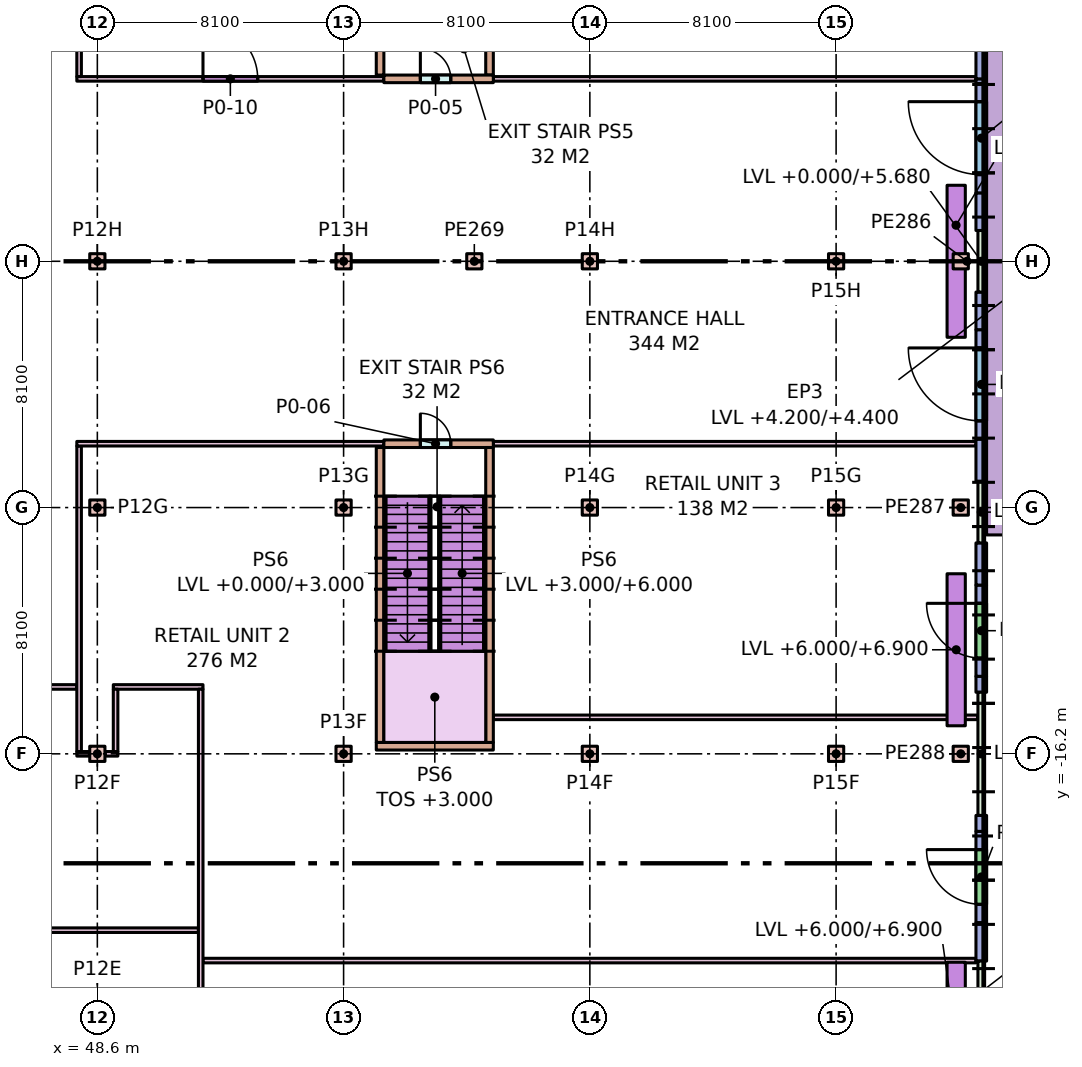
"""IFC4 building model, lengths in metres.
Left out: names, types, materials, properties, quantities, classifications, styles, units other than length and angle.
Written with IfcOpenShell. Run it as: python <this file> out.ifc"""

import sys

from ifc_helpers import new_model, si_unit, direction, frame, frame_2d, origin, origin_2d, place, context, subcontext, project, spatial, rectangle, extrude, element, fill, save


model = new_model("IFC4")
c1 = context("Model", 3, precision=1e-05, world=origin(), true_north=direction((0.0, 1.0)))
c2 = subcontext(c1, "Body", "Model", "MODEL_VIEW")
j1 = project(units=[si_unit("LENGTHUNIT", "METRE"), si_unit("PLANEANGLEUNIT", "RADIAN")], contexts=[c1])
p1 = place(None, origin())
s1 = spatial("IfcSite", under=j1, at=p1, CompositionType="ELEMENT")
p2 = place(p1, origin())
s2 = spatial("IfcBuilding", under=s1, at=p2, CompositionType="ELEMENT")
p3 = place(p2, origin())
s3 = spatial("IfcBuildingStorey", under=s2, at=p3, CompositionType="ELEMENT", Elevation=0.0)
for number, where, z_axis, x_axis in (
    (1, (48.6, -16.2, 0.0), (0.0, 0.0, 1.0), (1.0, 0.0, 0.0)),
    (2, (48.6, -8.1, 0.0), (0.0, 0.0, 1.0), (1.0, 0.0, 0.0)),
    (3, (48.6, 0.0, 0.0), (0.0, 0.0, 1.0), (1.0, 0.0, 0.0)),
    (4, (56.7, -16.2, 0.0), (0.0, 0.0, 1.0), (1.0, 0.0, 0.0)),
    (5, (56.7, -8.1, 0.0), (0.0, 0.0, 1.0), (1.0, 0.0, 0.0)),
    (6, (56.7, 0.0, 0.0), (0.0, 0.0, 1.0), (1.0, 0.0, 0.0)),
    (7, (64.8, -16.2, 0.0), (0.0, 0.0, 1.0), (1.0, 0.0, 0.0)),
    (8, (64.8, -8.1, 0.0), (0.0, 0.0, 1.0), (1.0, 0.0, 0.0)),
    (9, (64.8, 0.0, 0.0), (0.0, 0.0, 1.0), (1.0, 0.0, 0.0)),
    (10, (72.9, -16.2, 0.0), (0.0, 0.0, 1.0), (1.0, 0.0, 0.0)),
    (11, (72.9, -8.1, 0.0), (0.0, 0.0, 1.0), (1.0, 0.0, 0.0)),
    (12, (72.9, 0.0, 0.0), (0.0, 0.0, 1.0), (1.0, 0.0, 0.0)),
    (13, (61.0, 0.0, 0.0), (0.0, 0.0, 1.0), (1.0, 0.0, 0.0)),
    (14, (77.0, 0.0, 0.0), (0.0, 0.0, 1.0), (1.0, 0.0, 0.0)),
    (15, (77.0, -8.1, 0.0), (0.0, 0.0, 1.0), (1.0, 0.0, 0.0)),
    (16, (77.0, -16.2, 0.0), (0.0, 0.0, 1.0), (1.0, 0.0, 0.0)),
):
    element("IfcColumn", number, at=place(p3, frame(where, z_axis=z_axis, x_axis=x_axis)), inside=s3, PredefinedType="COLUMN", context=c2, shape_type="SweptSolid", body=[
        extrude(rectangle(XDim=0.5, YDim=0.5, at=origin_2d()), origin(), (0.0, 0.0, 1.0), 6.0),
    ])
p4 = place(p3, frame((77.675, -23.017, 0.0), z_axis=(0.0, 0.0, 1.0), x_axis=(0.0, 1.0, 0.0)))
e17 = element("IfcWall", 17, at=p4, inside=s3, PredefinedType="STANDARD", context=c2, shape_type="SweptSolid", body=[
    extrude(rectangle(XDim=1.267, YDim=0.35, at=frame_2d((0.633, 0.0))), origin(), (0.0, 0.0, 1.0), 5.68),
])
p5 = place(p3, frame((77.675, -21.75, 0.0), z_axis=(0.0, 0.0, 1.0), x_axis=(0.0, 1.0, 0.0)))
e18 = element("IfcWall", 18, at=p5, inside=s3, PredefinedType="STANDARD", context=c2, shape_type="SweptSolid", body=[
    extrude(rectangle(XDim=3.0, YDim=0.35, at=frame_2d((1.5, 0.0))), origin(), (0.0, 0.0, 1.0), 5.68),
])
p6 = place(p5, frame((0.6, 0.0, 0.0)))
e19 = element("IfcOpeningElement", 19, at=p6, cuts=e18, PredefinedType="OPENING", context=c2, shape_type="SweptSolid", body=[
    extrude(rectangle(XDim=1.8, YDim=2.7, at=frame_2d((0.9, 1.35))), frame((0.0, 0.185, 0.0), z_axis=(0.0, -1.0, 0.0), x_axis=(1.0, 0.0, 0.0)), (0.0, 0.0, 1.0), 0.37),
])
p7 = place(p3, frame((77.675, -18.75, 0.0), z_axis=(0.0, 0.0, 1.0), x_axis=(0.0, 1.0, 0.0)))
e20 = element("IfcWall", 20, at=p7, inside=s3, PredefinedType="STANDARD", context=c2, shape_type="SweptSolid", body=[
    extrude(rectangle(XDim=0.525, YDim=0.35, at=frame_2d((0.262, 0.0))), origin(), (0.0, 0.0, 1.0), 5.68),
])
p8 = place(p3, frame((77.675, -14.175, 0.0), z_axis=(0.0, 0.0, 1.0), x_axis=(0.0, 1.0, 0.0)))
e21 = element("IfcWall", 21, at=p8, inside=s3, PredefinedType="STANDARD", context=c2, shape_type="SweptSolid", body=[
    extrude(rectangle(XDim=0.525, YDim=0.35, at=frame_2d((0.263, 0.0))), origin(), (0.0, 0.0, 1.0), 5.68),
])
p9 = place(p3, frame((77.675, -13.65, 0.0), z_axis=(0.0, 0.0, 1.0), x_axis=(0.0, 1.0, 0.0)))
e22 = element("IfcWall", 22, at=p9, inside=s3, PredefinedType="STANDARD", context=c2, shape_type="SweptSolid", body=[
    extrude(rectangle(XDim=3.0, YDim=0.35, at=frame_2d((1.5, 0.0))), origin(), (0.0, 0.0, 1.0), 5.68),
])
p10 = place(p9, frame((0.6, 0.0, 0.0)))
e23 = element("IfcOpeningElement", 23, at=p10, cuts=e22, PredefinedType="OPENING", context=c2, shape_type="SweptSolid", body=[
    extrude(rectangle(XDim=1.8, YDim=2.7, at=frame_2d((0.9, 1.35))), frame((0.0, 0.185, 0.0), z_axis=(0.0, -1.0, 0.0), x_axis=(1.0, 0.0, 0.0)), (0.0, 0.0, 1.0), 0.37),
])
for number, where, z_axis, x_axis in (
    (24, (77.675, -10.65, 0.0), (0.0, 0.0, 1.0), (0.0, 1.0, 0.0)),
    (25, (77.675, -7.238, 0.0), (0.0, 0.0, 1.0), (0.0, 1.0, 0.0)),
):
    element("IfcWall", number, at=place(p3, frame(where, z_axis=z_axis, x_axis=x_axis)), inside=s3, PredefinedType="STANDARD", context=c2, shape_type="SweptSolid", body=[
        extrude(rectangle(XDim=1.387, YDim=0.35, at=frame_2d((0.694, 0.0))), origin(), (0.0, 0.0, 1.0), 5.68),
    ])
p11 = place(p3, frame((77.675, -5.85, 0.0), z_axis=(0.0, 0.0, 1.0), x_axis=(0.0, 1.0, 0.0)))
e26 = element("IfcWall", 26, at=p11, inside=s3, PredefinedType="STANDARD", context=c2, shape_type="SweptSolid", body=[
    extrude(rectangle(XDim=3.6, YDim=0.35, at=frame_2d((1.8, 0.0))), origin(), (0.0, 0.0, 1.0), 5.68),
])
p12 = place(p11, frame((0.6, 0.0, 0.0)))
e27 = element("IfcOpeningElement", 27, at=p12, cuts=e26, PredefinedType="OPENING", context=c2, shape_type="SweptSolid", body=[
    extrude(rectangle(XDim=2.4, YDim=2.7, at=frame_2d((1.2, 1.35))), frame((0.0, 0.185, 0.0), z_axis=(0.0, -1.0, 0.0), x_axis=(1.0, 0.0, 0.0)), (0.0, 0.0, 1.0), 0.37),
])
for number, where, z_axis, x_axis in (
    (28, (77.675, -2.25, 0.0), (0.0, 0.0, 1.0), (0.0, 1.0, 0.0)),
    (29, (77.675, 1.012, 0.0), (0.0, 0.0, 1.0), (0.0, 1.0, 0.0)),
):
    element("IfcWall", number, at=place(p3, frame(where, z_axis=z_axis, x_axis=x_axis)), inside=s3, PredefinedType="STANDARD", context=c2, shape_type="SweptSolid", body=[
        extrude(rectangle(XDim=1.238, YDim=0.35, at=frame_2d((0.619, 0.0))), origin(), (0.0, 0.0, 1.0), 5.68),
    ])
p13 = place(p3, frame((77.675, 2.25, 0.0), z_axis=(0.0, 0.0, 1.0), x_axis=(0.0, 1.0, 0.0)))
e30 = element("IfcWall", 30, at=p13, inside=s3, PredefinedType="STANDARD", context=c2, shape_type="SweptSolid", body=[
    extrude(rectangle(XDim=3.6, YDim=0.35, at=frame_2d((1.8, 0.0))), origin(), (0.0, 0.0, 1.0), 5.68),
])
p14 = place(p13, frame((0.6, 0.0, 0.0)))
e31 = element("IfcOpeningElement", 31, at=p14, cuts=e30, PredefinedType="OPENING", context=c2, shape_type="SweptSolid", body=[
    extrude(rectangle(XDim=2.4, YDim=2.7, at=frame_2d((1.2, 1.35))), frame((0.0, 0.185, 0.0), z_axis=(0.0, -1.0, 0.0), x_axis=(1.0, 0.0, 0.0)), (0.0, 0.0, 1.0), 0.37),
])
p15 = place(p3, frame((77.675, 5.85, 0.0), z_axis=(0.0, 0.0, 1.0), x_axis=(0.0, 1.0, 0.0)))
e32 = element("IfcWall", 32, at=p15, inside=s3, PredefinedType="STANDARD", context=c2, shape_type="SweptSolid", body=[
    extrude(rectangle(XDim=0.15, YDim=0.35, at=frame_2d((0.075, 0.0))), origin(), (0.0, 0.0, 1.0), 5.68),
])
p16 = place(p3, frame((77.675, 6.0, 0.0), z_axis=(0.0, 0.0, 1.0), x_axis=(0.0, 1.0, 0.0)))
e33 = element("IfcWall", 33, at=p16, inside=s3, PredefinedType="STANDARD", context=c2, shape_type="SweptSolid", body=[
    extrude(rectangle(XDim=0.975, YDim=0.35, at=frame_2d((0.488, 0.0))), origin(), (0.0, 0.0, 1.0), 5.68),
])
for number, where, z_axis, x_axis in (
    (34, (76.85, -28.055, 6.0), (0.0, 0.0, 1.0), (0.0, 1.0, 0.0)),
    (35, (76.85, -15.277, 6.0), (0.0, 0.0, 1.0), (0.0, 1.0, 0.0)),
    (36, (76.85, -2.5, 6.0), (0.0, 0.0, 1.0), (0.0, 1.0, 0.0)),
):
    element("IfcWall", number, at=place(p3, frame(where, z_axis=z_axis, x_axis=x_axis)), inside=s3, PredefinedType="PARAPET", context=c2, shape_type="SweptSolid", body=[
        extrude(rectangle(XDim=5.0, YDim=0.6, at=frame_2d((2.5, 0.0))), origin(), (0.0, 0.0, 1.0), 0.9),
    ])
p17 = place(p3, frame((41.025, -14.0, 0.0), z_axis=(0.0, 0.0, 1.0), x_axis=(1.0, 0.0, 0.0)))
e37 = element("IfcWall", 37, at=p17, inside=s3, PredefinedType="PARTITIONING", context=c2, shape_type="SweptSolid", body=[
    extrude(rectangle(XDim=6.9, YDim=0.15, at=frame_2d((3.45, 0.0))), origin(), (0.0, 0.0, 1.0), 5.68),
])
p18 = place(p17, frame((2.95, 0.0, 0.0)))
e38 = element("IfcOpeningElement", 38, at=p18, cuts=e37, PredefinedType="OPENING", context=c2, shape_type="SweptSolid", body=[
    extrude(rectangle(XDim=1.0, YDim=2.1, at=frame_2d((0.5, 1.05))), frame((0.0, 0.085, 0.0), z_axis=(0.0, -1.0, 0.0), x_axis=(1.0, 0.0, 0.0)), (0.0, 0.0, 1.0), 0.17),
])
p19 = place(p3, frame((47.925, -16.2, 0.0), z_axis=(0.0, 0.0, 1.0), x_axis=(1.0, 0.0, 0.0)))
e39 = element("IfcWall", 39, at=p19, inside=s3, PredefinedType="PARTITIONING", context=c2, shape_type="SweptSolid", body=[
    extrude(rectangle(XDim=0.415, YDim=0.15, at=frame_2d((0.208, 0.0))), origin(), (0.0, 0.0, 1.0), 5.68),
])
p20 = place(p3, frame((48.86, -16.2, 0.0), z_axis=(0.0, 0.0, 1.0), x_axis=(1.0, 0.0, 0.0)))
e40 = element("IfcWall", 40, at=p20, inside=s3, PredefinedType="PARTITIONING", context=c2, shape_type="SweptSolid", body=[
    extrude(rectangle(XDim=0.415, YDim=0.15, at=frame_2d((0.208, 0.0))), origin(), (0.0, 0.0, 1.0), 5.68),
])
p21 = place(p3, frame((49.125, -14.0, 0.0), z_axis=(0.0, 0.0, 1.0), x_axis=(1.0, 0.0, 0.0)))
e41 = element("IfcWall", 41, at=p21, inside=s3, PredefinedType="PARTITIONING", context=c2, shape_type="SweptSolid", body=[
    extrude(rectangle(XDim=2.95, YDim=0.15, at=frame_2d((1.475, 0.0))), origin(), (0.0, 0.0, 1.0), 5.68),
])
p22 = place(p3, frame((48.0, -16.125, 0.0), z_axis=(0.0, 0.0, 1.0), x_axis=(0.0, 1.0, 0.0)))
e42 = element("IfcWall", 42, at=p22, inside=s3, PredefinedType="PARTITIONING", context=c2, shape_type="SweptSolid", body=[
    extrude(rectangle(XDim=10.05, YDim=0.15, at=frame_2d((5.025, 0.0))), origin(), (0.0, 0.0, 1.0), 5.68),
])
p23 = place(p3, frame((49.2, -16.125, 0.0), z_axis=(0.0, 0.0, 1.0), x_axis=(0.0, 1.0, 0.0)))
e43 = element("IfcWall", 43, at=p23, inside=s3, PredefinedType="PARTITIONING", context=c2, shape_type="SweptSolid", body=[
    extrude(rectangle(XDim=2.05, YDim=0.15, at=frame_2d((1.025, 0.0))), origin(), (0.0, 0.0, 1.0), 5.68),
])
p24 = place(p3, frame((34.125, -22.0, 0.0), z_axis=(0.0, 0.0, 1.0), x_axis=(1.0, 0.0, 0.0)))
e44 = element("IfcWall", 44, at=p24, inside=s3, PredefinedType="PARTITIONING", context=c2, shape_type="SweptSolid", body=[
    extrude(rectangle(XDim=17.8, YDim=0.15, at=frame_2d((8.9, 0.0))), origin(), (0.0, 0.0, 1.0), 5.68),
])
p25 = place(p3, frame((47.925, 6.0, 0.0), z_axis=(0.0, 0.0, 1.0), x_axis=(1.0, 0.0, 0.0)))
e45 = element("IfcWall", 45, at=p25, inside=s3, PredefinedType="PARTITIONING", context=c2, shape_type="SweptSolid", body=[
    extrude(rectangle(XDim=10.1, YDim=0.15, at=frame_2d((5.05, 0.0))), origin(), (0.0, 0.0, 1.0), 5.68),
])
p26 = place(p25, frame((4.15, 0.0, 0.0)))
e46 = element("IfcOpeningElement", 46, at=p26, cuts=e45, PredefinedType="OPENING", context=c2, shape_type="SweptSolid", body=[
    extrude(rectangle(XDim=1.8, YDim=2.4, at=frame_2d((0.9, 1.2))), frame((0.0, 0.085, 0.0), z_axis=(0.0, -1.0, 0.0), x_axis=(1.0, 0.0, 0.0)), (0.0, 0.0, 1.0), 0.17),
])
p27 = place(p3, frame((61.625, 6.0, 0.0), z_axis=(0.0, 0.0, 1.0), x_axis=(1.0, 0.0, 0.0)))
e47 = element("IfcWall", 47, at=p27, inside=s3, PredefinedType="PARTITIONING", context=c2, shape_type="SweptSolid", body=[
    extrude(rectangle(XDim=15.875, YDim=0.15, at=frame_2d((7.938, 0.0))), origin(), (0.0, 0.0, 1.0), 5.68),
])
p28 = place(p3, frame((48.0, 6.075, 0.0), z_axis=(0.0, 0.0, 1.0), x_axis=(0.0, 1.0, 0.0)))
e48 = element("IfcWall", 48, at=p28, inside=s3, PredefinedType="PARTITIONING", context=c2, shape_type="SweptSolid", body=[
    extrude(rectangle(XDim=7.85, YDim=0.15, at=frame_2d((3.925, 0.0))), origin(), (0.0, 0.0, 1.0), 5.68),
])
for number, where, z_axis, x_axis in (
    (49, (57.9, 6.125, 0.0), (0.0, 0.0, 1.0), (0.0, 1.0, 0.0)),
    (50, (61.5, 6.125, 0.0), (0.0, 0.0, 1.0), (0.0, 1.0, 0.0)),
):
    element("IfcWall", number, at=place(p3, frame(where, z_axis=z_axis, x_axis=x_axis)), inside=s3, PredefinedType="STANDARD", context=c2, shape_type="SweptSolid", body=[
        extrude(rectangle(XDim=9.7, YDim=0.25, at=frame_2d((4.85, 0.0))), origin(), (0.0, 0.0, 1.0), 5.68),
    ])
p29 = place(p3, frame((58.025, 6.0, 0.0), z_axis=(0.0, 0.0, 1.0), x_axis=(1.0, 0.0, 0.0)))
e51 = element("IfcWall", 51, at=p29, inside=s3, PredefinedType="STANDARD", context=c2, shape_type="SweptSolid", body=[
    extrude(rectangle(XDim=3.6, YDim=0.25, at=frame_2d((1.8, 0.0))), origin(), (0.0, 0.0, 1.0), 5.68),
])
p30 = place(p29, frame((1.2, 0.0, 0.0)))
e52 = element("IfcOpeningElement", 52, at=p30, cuts=e51, PredefinedType="OPENING", context=c2, shape_type="SweptSolid", body=[
    extrude(rectangle(XDim=1.0, YDim=2.1, at=frame_2d((0.5, 1.05))), frame((0.0, 0.135, 0.0), z_axis=(0.0, -1.0, 0.0), x_axis=(1.0, 0.0, 0.0)), (0.0, 0.0, 1.0), 0.27),
])
p31 = place(p3, frame((58.025, -6.0, 0.0), z_axis=(0.0, 0.0, 1.0), x_axis=(1.0, 0.0, 0.0)))
e53 = element("IfcWall", 53, at=p31, inside=s3, PredefinedType="STANDARD", context=c2, shape_type="SweptSolid", body=[
    extrude(rectangle(XDim=3.6, YDim=0.25, at=frame_2d((1.8, 0.0))), origin(), (0.0, 0.0, 1.0), 5.68),
])
p32 = place(p31, frame((1.2, 0.0, 0.0)))
e54 = element("IfcOpeningElement", 54, at=p32, cuts=e53, PredefinedType="OPENING", context=c2, shape_type="SweptSolid", body=[
    extrude(rectangle(XDim=1.0, YDim=2.1, at=frame_2d((0.5, 1.05))), frame((0.0, 0.135, 0.0), z_axis=(0.0, -1.0, 0.0), x_axis=(1.0, 0.0, 0.0)), (0.0, 0.0, 1.0), 0.27),
])
p33 = place(p3, frame((47.925, -6.0, 0.0), z_axis=(0.0, 0.0, 1.0), x_axis=(1.0, 0.0, 0.0)))
e55 = element("IfcWall", 55, at=p33, inside=s3, PredefinedType="PARTITIONING", context=c2, shape_type="SweptSolid", body=[
    extrude(rectangle(XDim=10.1, YDim=0.15, at=frame_2d((5.05, 0.0))), origin(), (0.0, 0.0, 1.0), 5.68),
])
p34 = place(p3, frame((61.625, -6.0, 0.0), z_axis=(0.0, 0.0, 1.0), x_axis=(1.0, 0.0, 0.0)))
e56 = element("IfcWall", 56, at=p34, inside=s3, PredefinedType="PARTITIONING", context=c2, shape_type="SweptSolid", body=[
    extrude(rectangle(XDim=15.875, YDim=0.15, at=frame_2d((7.938, 0.0))), origin(), (0.0, 0.0, 1.0), 5.68),
])
p35 = place(p3, frame((57.775, -15.95, 0.0), z_axis=(0.0, 0.0, 1.0), x_axis=(1.0, 0.0, 0.0)))
e57 = element("IfcWall", 57, at=p35, inside=s3, PredefinedType="STANDARD", context=c2, shape_type="SweptSolid", body=[
    extrude(rectangle(XDim=3.85, YDim=0.25, at=frame_2d((1.925, 0.0))), origin(), (0.0, 0.0, 1.0), 5.68),
])
for number, where, z_axis, x_axis in (
    (58, (57.9, -15.825, 0.0), (0.0, 0.0, 1.0), (0.0, 1.0, 0.0)),
    (59, (61.5, -15.825, 0.0), (0.0, 0.0, 1.0), (0.0, 1.0, 0.0)),
):
    element("IfcWall", number, at=place(p3, frame(where, z_axis=z_axis, x_axis=x_axis)), inside=s3, PredefinedType="STANDARD", context=c2, shape_type="SweptSolid", body=[
        extrude(rectangle(XDim=9.7, YDim=0.25, at=frame_2d((4.85, 0.0))), origin(), (0.0, 0.0, 1.0), 5.68),
    ])
p36 = place(p3, frame((52.075, -23.0, 0.0), z_axis=(0.0, 0.0, 1.0), x_axis=(1.0, 0.0, 0.0)))
e60 = element("IfcWall", 60, at=p36, inside=s3, PredefinedType="PARTITIONING", context=c2, shape_type="SweptSolid", body=[
    extrude(rectangle(XDim=25.425, YDim=0.15, at=frame_2d((12.712, 0.0))), origin(), (0.0, 0.0, 1.0), 5.68),
])
p37 = place(p3, frame((52.0, -43.5, 0.0), z_axis=(0.0, 0.0, 1.0), x_axis=(0.0, 1.0, 0.0)))
e61 = element("IfcWall", 61, at=p37, inside=s3, PredefinedType="PARTITIONING", context=c2, shape_type="SweptSolid", body=[
    extrude(rectangle(XDim=29.425, YDim=0.15, at=frame_2d((14.712, 0.0))), origin(), (0.0, 0.0, 1.0), 5.68),
])
p38 = place(p3, frame((61.625, -15.0, 0.0), z_axis=(0.0, 0.0, 1.0), x_axis=(1.0, 0.0, 0.0)))
e62 = element("IfcWall", 62, at=p38, inside=s3, PredefinedType="PARTITIONING", context=c2, shape_type="SweptSolid", body=[
    extrude(rectangle(XDim=15.93, YDim=0.15, at=frame_2d((7.965, 0.0))), origin(), (0.0, 0.0, 1.0), 5.68),
])
p39 = place(p30, origin())
e63 = element("IfcDoor", 63, at=p39, inside=s3, OperationType="SINGLE_SWING_LEFT", PredefinedType="DOOR", context=c2, shape_type="SweptSolid", body=[
    extrude(rectangle(XDim=1.0, YDim=2.1, at=frame_2d((0.5, 1.05))), frame((0.0, 0.025, 0.0), z_axis=(0.0, -1.0, 0.0), x_axis=(1.0, 0.0, 0.0)), (0.0, 0.0, 1.0), 0.05),
])
fill(e52, e63)
p40 = place(p32, origin())
e64 = element("IfcDoor", 64, at=p40, inside=s3, OperationType="SINGLE_SWING_LEFT", PredefinedType="DOOR", context=c2, shape_type="SweptSolid", body=[
    extrude(rectangle(XDim=1.0, YDim=2.1, at=frame_2d((0.5, 1.05))), frame((0.0, 0.025, 0.0), z_axis=(0.0, -1.0, 0.0), x_axis=(1.0, 0.0, 0.0)), (0.0, 0.0, 1.0), 0.05),
])
fill(e54, e64)
p41 = place(p26, origin())
e65 = element("IfcDoor", 65, at=p41, inside=s3, OperationType="SINGLE_SWING_LEFT", PredefinedType="DOOR", context=c2, shape_type="SweptSolid", body=[
    extrude(rectangle(XDim=1.8, YDim=2.4, at=frame_2d((0.9, 1.2))), frame((0.0, 0.025, 0.0), z_axis=(0.0, -1.0, 0.0), x_axis=(1.0, 0.0, 0.0)), (0.0, 0.0, 1.0), 0.05),
])
fill(e46, e65)
p42 = place(p12, frame((2.4, 0.0, 0.0), z_axis=(0.0, 0.0, 1.0), x_axis=(-1.0, 0.0, 0.0)))
e66 = element("IfcDoor", 66, at=p42, inside=s3, OperationType="SINGLE_SWING_RIGHT", PredefinedType="DOOR", context=c2, shape_type="SweptSolid", body=[
    extrude(rectangle(XDim=2.4, YDim=2.7, at=frame_2d((1.2, 1.35))), frame((0.0, 0.025, 0.0), z_axis=(0.0, -1.0, 0.0), x_axis=(1.0, 0.0, 0.0)), (0.0, 0.0, 1.0), 0.05),
])
fill(e27, e66)
p43 = place(p14, frame((2.4, 0.0, 0.0), z_axis=(0.0, 0.0, 1.0), x_axis=(-1.0, 0.0, 0.0)))
e67 = element("IfcDoor", 67, at=p43, inside=s3, OperationType="SINGLE_SWING_RIGHT", PredefinedType="DOOR", context=c2, shape_type="SweptSolid", body=[
    extrude(rectangle(XDim=2.4, YDim=2.7, at=frame_2d((1.2, 1.35))), frame((0.0, 0.025, 0.0), z_axis=(0.0, -1.0, 0.0), x_axis=(1.0, 0.0, 0.0)), (0.0, 0.0, 1.0), 0.05),
])
fill(e31, e67)
p44 = place(p10, frame((1.8, 0.0, 0.0), z_axis=(0.0, 0.0, 1.0), x_axis=(-1.0, 0.0, 0.0)))
e68 = element("IfcDoor", 68, at=p44, inside=s3, OperationType="SINGLE_SWING_RIGHT", PredefinedType="DOOR", context=c2, shape_type="SweptSolid", body=[
    extrude(rectangle(XDim=1.8, YDim=2.7, at=frame_2d((0.9, 1.35))), frame((0.0, 0.025, 0.0), z_axis=(0.0, -1.0, 0.0), x_axis=(1.0, 0.0, 0.0)), (0.0, 0.0, 1.0), 0.05),
])
fill(e23, e68)
p45 = place(p6, frame((1.8, 0.0, 0.0), z_axis=(0.0, 0.0, 1.0), x_axis=(-1.0, 0.0, 0.0)))
e69 = element("IfcDoor", 69, at=p45, inside=s3, OperationType="SINGLE_SWING_RIGHT", PredefinedType="DOOR", context=c2, shape_type="SweptSolid", body=[
    extrude(rectangle(XDim=1.8, YDim=2.7, at=frame_2d((0.9, 1.35))), frame((0.0, 0.025, 0.0), z_axis=(0.0, -1.0, 0.0), x_axis=(1.0, 0.0, 0.0)), (0.0, 0.0, 1.0), 0.05),
])
fill(e19, e69)
save(model, sys.argv[1])
